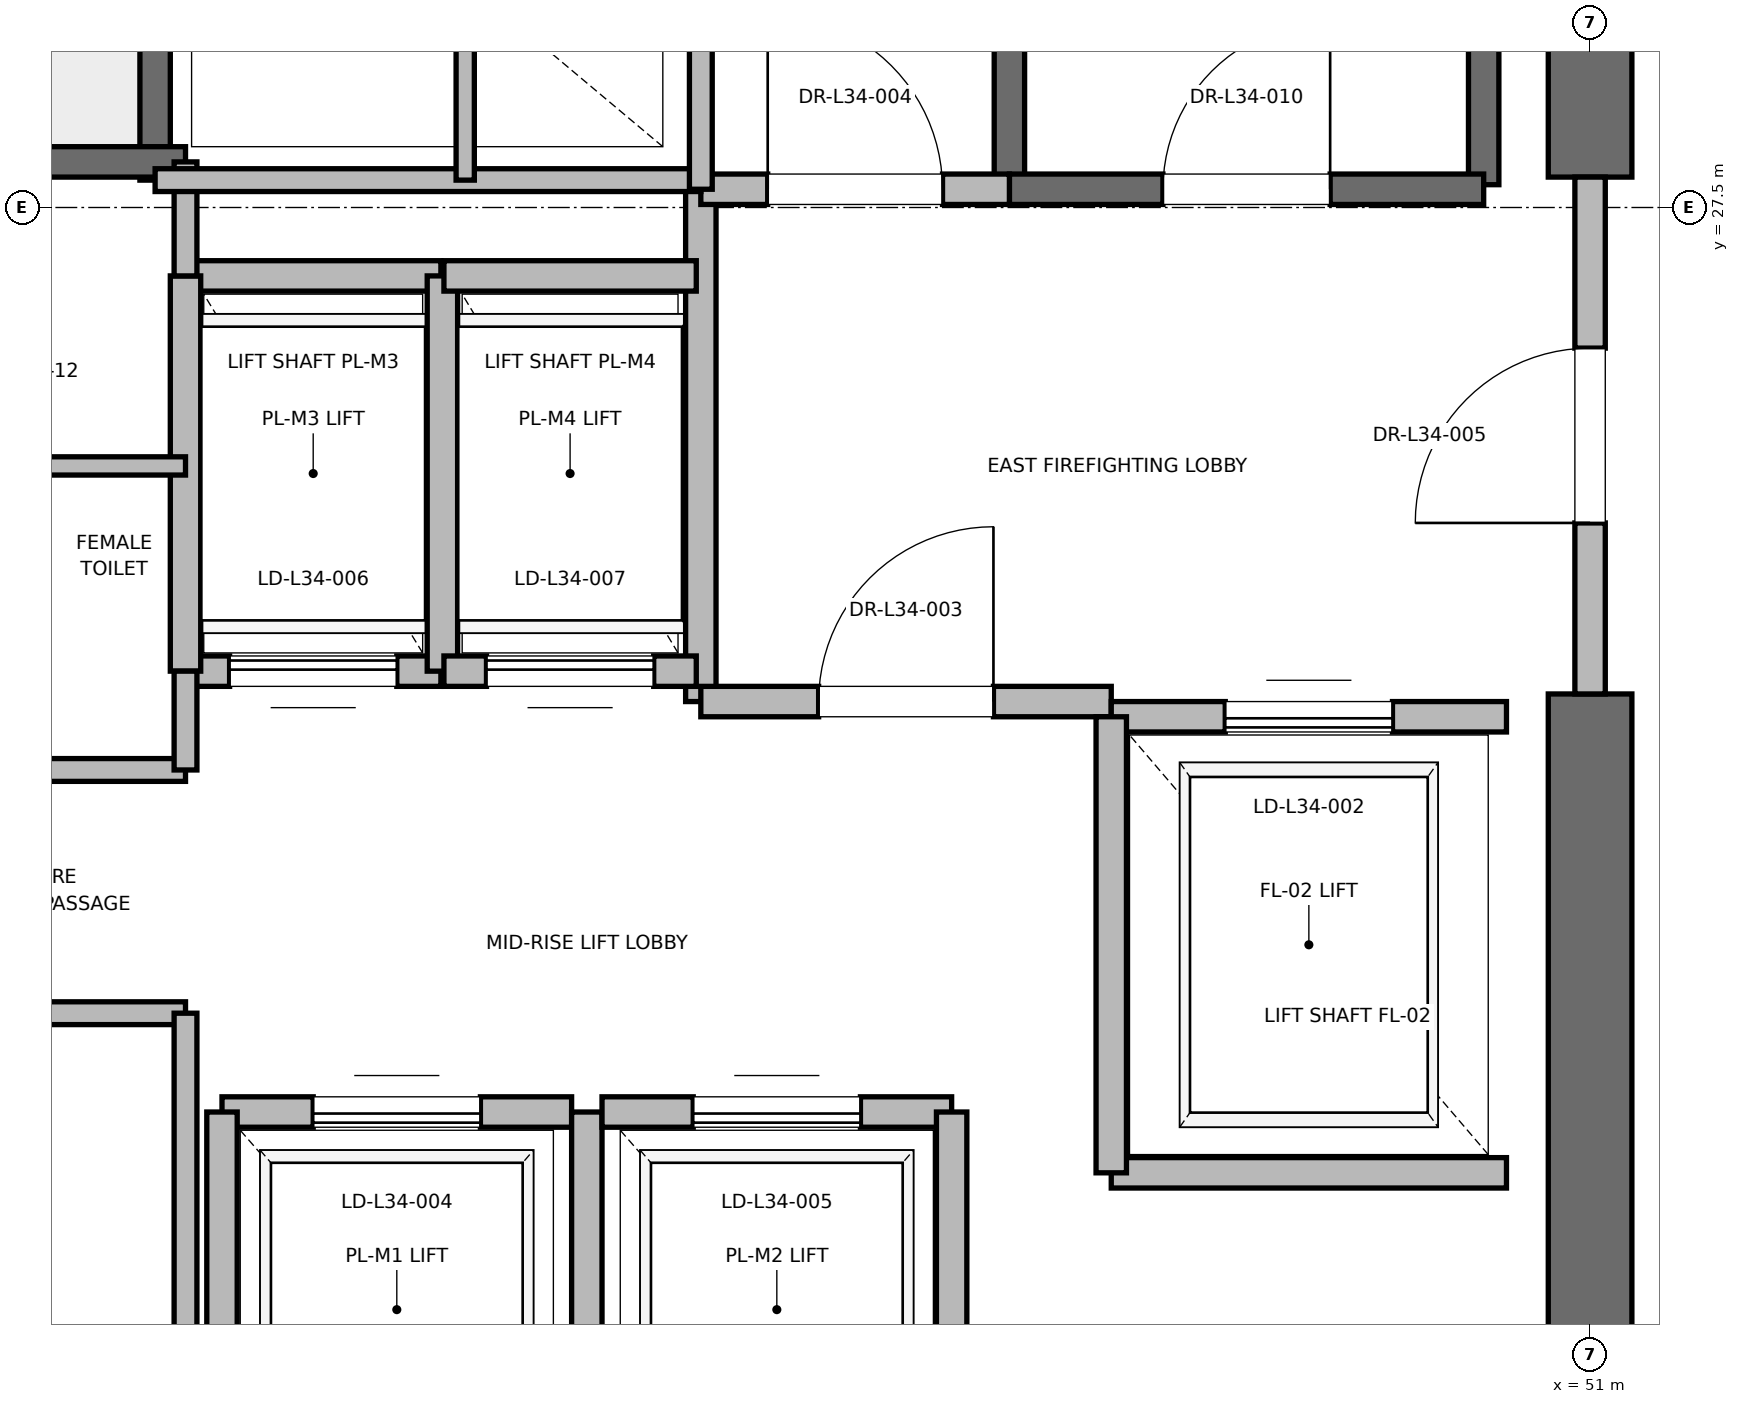
"""IFC4 building model, lengths in metres.
Left out: names, types, materials, properties, quantities, classifications, styles, units other than length and angle.
Written with IfcOpenShell. Run it as: python <this file> out.ifc"""

import sys

from ifc_helpers import new_model, si_unit, direction, frame, frame_2d, origin, place, context, subcontext, project, spatial, rectangle, extrude, element, fill, save


model = new_model("IFC4")
c1 = context("Model", 3, precision=1e-05, world=origin(), true_north=direction((0.0, 1.0)))
c2 = subcontext(c1, "Body", "Model", "MODEL_VIEW")
j1 = project(units=[si_unit("LENGTHUNIT", "METRE"), si_unit("PLANEANGLEUNIT", "RADIAN")], contexts=[c1])
p1 = place(None, origin())
s1 = spatial("IfcSite", under=j1, at=p1, CompositionType="ELEMENT")
p2 = place(p1, origin())
s2 = spatial("IfcBuilding", under=s1, at=p2, CompositionType="ELEMENT")
p3 = place(p2, frame((0.0, 0.0, 148.4)))
s3 = spatial("IfcBuildingStorey", under=s2, at=p3, CompositionType="ELEMENT", Elevation=148.4)
p4 = place(p3, frame((51.0, 18.5, 0.0), z_axis=(0.0, 0.0, 1.0), x_axis=(0.0, 1.0, 0.0)))
e1 = element("IfcWall", 1, at=p4, inside=s3, PredefinedType="SHEAR", context=c2, shape_type="SweptSolid", body=[
    extrude(rectangle(XDim=5.8, YDim=0.55, at=frame_2d((2.9, 0.0))), origin(), (0.0, 0.0, 1.0), 3.775),
])
p5 = place(p3, frame((51.0, 27.7, 0.0), z_axis=(0.0, 0.0, 1.0), x_axis=(0.0, 1.0, 0.0)))
e2 = element("IfcWall", 2, at=p5, inside=s3, PredefinedType="SHEAR", context=c2, shape_type="SweptSolid", body=[
    extrude(rectangle(XDim=8.8, YDim=0.55, at=frame_2d((4.4, 0.0))), origin(), (0.0, 0.0, 1.0), 3.775),
])
p6 = place(p3, frame((50.3, 27.65, 0.0), z_axis=(0.0, 0.0, 1.0), x_axis=(0.0, 1.0, 0.0)))
e3 = element("IfcWall", 3, at=p6, inside=s3, PredefinedType="SOLIDWALL", context=c2, shape_type="SweptSolid", body=[
    extrude(rectangle(XDim=8.15, YDim=0.2, at=frame_2d((4.075, 0.0))), origin(), (0.0, 0.0, 1.0), 3.775),
])
p7 = place(p3, frame((47.18, 27.62, 0.0), z_axis=(0.0, 0.0, 1.0), x_axis=(0.0, 1.0, 0.0)))
e4 = element("IfcWall", 4, at=p7, inside=s3, PredefinedType="SOLIDWALL", context=c2, shape_type="SweptSolid", body=[
    extrude(rectangle(XDim=8.18, YDim=0.2, at=frame_2d((4.09, 0.0))), origin(), (0.0, 0.0, 1.0), 3.775),
])
p8 = place(p3, frame((47.18, 27.62, 0.0), z_axis=(0.0, 0.0, 1.0), x_axis=(1.0, 0.0, 0.0)))
e5 = element("IfcWall", 5, at=p8, inside=s3, PredefinedType="SOLIDWALL", context=c2, shape_type="SweptSolid", body=[
    extrude(rectangle(XDim=3.12, YDim=0.2, at=frame_2d((1.56, 0.0))), origin(), (0.0, 0.0, 1.0), 3.775),
])
p9 = place(p8, frame((1.01, 0.0, 0.0)))
e6 = element("IfcOpeningElement", 6, at=p9, cuts=e5, PredefinedType="OPENING", context=c2, shape_type="SweptSolid", body=[
    extrude(rectangle(XDim=1.1, YDim=2.15, at=frame_2d((0.55, 1.075))), frame((0.0, 0.1, 0.0), z_axis=(0.0, -1.0, 0.0), x_axis=(1.0, 0.0, 0.0)), (0.0, 0.0, 1.0), 0.2),
])
p10 = place(p3, frame((41.56, 27.68, 0.0), z_axis=(0.0, 0.0, 1.0), x_axis=(0.0, 1.0, 0.0)))
e7 = element("IfcWall", 7, at=p10, inside=s3, PredefinedType="SOLIDWALL", context=c2, shape_type="SweptSolid", body=[
    extrude(rectangle(XDim=8.57, YDim=0.2, at=frame_2d((4.285, 0.0))), origin(), (0.0, 0.0, 1.0), 3.775),
])
p11 = place(p3, frame((38.44, 27.8, 0.0), z_axis=(0.0, 0.0, 1.0), x_axis=(1.0, 0.0, 0.0)))
e8 = element("IfcWall", 8, at=p11, inside=s3, PredefinedType="SOLIDWALL", context=c2, shape_type="SweptSolid", body=[
    extrude(rectangle(XDim=3.32, YDim=0.2, at=frame_2d((1.66, 0.0))), origin(), (0.0, 0.0, 1.0), 3.775),
])
p12 = place(p3, frame((45.15, 24.25, 0.0), z_axis=(0.0, 0.0, 1.0), x_axis=(0.0, 1.0, 0.0)))
e9 = element("IfcWall", 9, at=p12, inside=s3, PredefinedType="PARTITIONING", context=c2, shape_type="SweptSolid", body=[
    extrude(rectangle(XDim=3.37, YDim=0.2, at=frame_2d((1.685, 0.0))), origin(), (0.0, 0.0, 1.0), 3.775),
])
p13 = place(p3, frame((45.15, 24.25, 0.0), z_axis=(0.0, 0.0, 1.0), x_axis=(1.0, 0.0, 0.0)))
e10 = element("IfcWall", 10, at=p13, inside=s3, PredefinedType="PARTITIONING", context=c2, shape_type="SweptSolid", body=[
    extrude(rectangle(XDim=2.7, YDim=0.2, at=frame_2d((1.35, 0.0))), origin(), (0.0, 0.0, 1.0), 3.775),
])
p14 = place(p13, frame((0.775, 0.0, 0.0)))
e11 = element("IfcOpeningElement", 11, at=p14, cuts=e10, PredefinedType="OPENING", context=c2, shape_type="SweptSolid", body=[
    extrude(rectangle(XDim=1.15, YDim=2.2, at=frame_2d((0.575, 1.1))), frame((0.0, 0.1, 0.0), z_axis=(0.0, -1.0, 0.0), x_axis=(1.0, 0.0, 0.0)), (0.0, 0.0, 1.0), 0.2),
])
p15 = place(p3, frame((45.15, 27.62, 0.0), z_axis=(0.0, 0.0, 1.0), x_axis=(1.0, 0.0, 0.0)))
e12 = element("IfcWall", 12, at=p15, inside=s3, PredefinedType="PARTITIONING", context=c2, shape_type="SweptSolid", body=[
    extrude(rectangle(XDim=2.03, YDim=0.2, at=frame_2d((1.015, 0.0))), origin(), (0.0, 0.0, 1.0), 3.775),
])
p16 = place(p15, frame((0.44, 0.0, 0.0)))
e13 = element("IfcOpeningElement", 13, at=p16, cuts=e12, PredefinedType="OPENING", context=c2, shape_type="SweptSolid", body=[
    extrude(rectangle(XDim=1.15, YDim=2.2, at=frame_2d((0.575, 1.1))), frame((0.0, 0.1, 0.0), z_axis=(0.0, -1.0, 0.0), x_axis=(1.0, 0.0, 0.0)), (0.0, 0.0, 1.0), 0.2),
])
p17 = place(p3, frame((51.0, 24.3, 0.0), z_axis=(0.0, 0.0, 1.0), x_axis=(0.0, 1.0, 0.0)))
e14 = element("IfcWall", 14, at=p17, inside=s3, PredefinedType="PARTITIONING", context=c2, shape_type="SweptSolid", body=[
    extrude(rectangle(XDim=3.4, YDim=0.2, at=frame_2d((1.7, 0.0))), origin(), (0.0, 0.0, 1.0), 2.755),
])
p18 = place(p17, frame((1.125, 0.0, 0.0)))
e15 = element("IfcOpeningElement", 15, at=p18, cuts=e14, PredefinedType="OPENING", context=c2, shape_type="SweptSolid", body=[
    extrude(rectangle(XDim=1.15, YDim=2.2, at=frame_2d((0.575, 1.1))), frame((0.0, 0.1, 0.0), z_axis=(0.0, -1.0, 0.0), x_axis=(1.0, 0.0, 0.0)), (0.0, 0.0, 1.0), 0.2),
])
p19 = place(p3, frame((47.85, 21.15, 0.0), z_axis=(0.0, 0.0, 1.0), x_axis=(1.0, 0.0, 0.0)))
e16 = element("IfcWall", 16, at=p19, inside=s3, PredefinedType="SOLIDWALL", context=c2, shape_type="SweptSolid", body=[
    extrude(rectangle(XDim=2.6, YDim=0.2, at=frame_2d((1.3, 0.0))), origin(), (0.0, 0.0, 1.0), 3.775),
])
p20 = place(p3, frame((50.45, 24.15, 0.0), z_axis=(0.0, 0.0, 1.0), x_axis=(-1.0, 0.0, 0.0)))
e17 = element("IfcWall", 17, at=p20, inside=s3, PredefinedType="SOLIDWALL", context=c2, shape_type="SweptSolid", body=[
    extrude(rectangle(XDim=2.6, YDim=0.2, at=frame_2d((1.3, 0.0))), origin(), (0.0, 0.0, 1.0), 2.755),
])
p21 = place(p20, frame((0.75, 0.0, 0.0)))
e18 = element("IfcOpeningElement", 18, at=p21, cuts=e17, PredefinedType="OPENING", context=c2, shape_type="SweptSolid", body=[
    extrude(rectangle(XDim=1.1, YDim=2.2, at=frame_2d((0.55, 1.1))), frame((0.0, 0.1, 0.0), z_axis=(0.0, -1.0, 0.0), x_axis=(1.0, 0.0, 0.0)), (0.0, 0.0, 1.0), 0.2),
])
p22 = place(p3, frame((47.85, 24.15, 0.0), z_axis=(0.0, 0.0, 1.0), x_axis=(0.0, -1.0, 0.0)))
e19 = element("IfcWall", 19, at=p22, inside=s3, PredefinedType="SOLIDWALL", context=c2, shape_type="SweptSolid", body=[
    extrude(rectangle(XDim=3.0, YDim=0.2, at=frame_2d((1.5, 0.0))), origin(), (0.0, 0.0, 1.0), 3.775),
])
p23 = place(p3, frame((44.3, 21.55, 0.0), z_axis=(0.0, 0.0, 1.0), x_axis=(-1.0, 0.0, 0.0)))
e20 = element("IfcWall", 20, at=p23, inside=s3, PredefinedType="SOLIDWALL", context=c2, shape_type="SweptSolid", body=[
    extrude(rectangle(XDim=2.3, YDim=0.2, at=frame_2d((1.15, 0.0))), origin(), (0.0, 0.0, 1.0), 3.775),
])
p24 = place(p23, frame((0.6, 0.0, 0.0)))
e21 = element("IfcOpeningElement", 21, at=p24, cuts=e20, PredefinedType="OPENING", context=c2, shape_type="SweptSolid", body=[
    extrude(rectangle(XDim=1.1, YDim=2.2, at=frame_2d((0.55, 1.1))), frame((0.0, 0.1, 0.0), z_axis=(0.0, -1.0, 0.0), x_axis=(1.0, 0.0, 0.0)), (0.0, 0.0, 1.0), 0.2),
])
p25 = place(p3, frame((42.0, 21.55, 0.0), z_axis=(0.0, 0.0, 1.0), x_axis=(0.0, -1.0, 0.0)))
e22 = element("IfcWall", 22, at=p25, inside=s3, PredefinedType="SOLIDWALL", context=c2, shape_type="SweptSolid", body=[
    extrude(rectangle(XDim=2.6, YDim=0.2, at=frame_2d((1.3, 0.0))), origin(), (0.0, 0.0, 1.0), 2.755),
])
p26 = place(p3, frame((44.4, 18.95, 0.0), z_axis=(0.0, 0.0, 1.0), x_axis=(0.0, 1.0, 0.0)))
e23 = element("IfcWall", 23, at=p26, inside=s3, PredefinedType="SOLIDWALL", context=c2, shape_type="SweptSolid", body=[
    extrude(rectangle(XDim=2.6, YDim=0.2, at=frame_2d((1.3, 0.0))), origin(), (0.0, 0.0, 1.0), 3.775),
])
p27 = place(p3, frame((46.8, 21.55, 0.0), z_axis=(0.0, 0.0, 1.0), x_axis=(-1.0, 0.0, 0.0)))
e24 = element("IfcWall", 24, at=p27, inside=s3, PredefinedType="SOLIDWALL", context=c2, shape_type="SweptSolid", body=[
    extrude(rectangle(XDim=2.3, YDim=0.2, at=frame_2d((1.15, 0.0))), origin(), (0.0, 0.0, 1.0), 3.775),
])
p28 = place(p27, frame((0.6, 0.0, 0.0)))
e25 = element("IfcOpeningElement", 25, at=p28, cuts=e24, PredefinedType="OPENING", context=c2, shape_type="SweptSolid", body=[
    extrude(rectangle(XDim=1.1, YDim=2.2, at=frame_2d((0.55, 1.1))), frame((0.0, 0.1, 0.0), z_axis=(0.0, -1.0, 0.0), x_axis=(1.0, 0.0, 0.0)), (0.0, 0.0, 1.0), 0.2),
])
p29 = place(p3, frame((46.8, 18.95, 0.0), z_axis=(0.0, 0.0, 1.0), x_axis=(0.0, 1.0, 0.0)))
e26 = element("IfcWall", 26, at=p29, inside=s3, PredefinedType="SOLIDWALL", context=c2, shape_type="SweptSolid", body=[
    extrude(rectangle(XDim=2.6, YDim=0.2, at=frame_2d((1.3, 0.0))), origin(), (0.0, 0.0, 1.0), 3.775),
])
p30 = place(p3, frame((41.76, 24.45, 0.0), z_axis=(0.0, 0.0, 1.0), x_axis=(1.0, 0.0, 0.0)))
e27 = element("IfcWall", 27, at=p30, inside=s3, PredefinedType="SOLIDWALL", context=c2, shape_type="SweptSolid", body=[
    extrude(rectangle(XDim=1.68, YDim=0.2, at=frame_2d((0.84, 0.0))), origin(), (0.0, 0.0, 1.0), 3.775),
])
p31 = place(p30, frame((0.29, 0.0, 0.0)))
e28 = element("IfcOpeningElement", 28, at=p31, cuts=e27, PredefinedType="OPENING", context=c2, shape_type="SweptSolid", body=[
    extrude(rectangle(XDim=1.1, YDim=2.2, at=frame_2d((0.55, 1.1))), frame((0.0, 0.1, 0.0), z_axis=(0.0, -1.0, 0.0), x_axis=(1.0, 0.0, 0.0)), (0.0, 0.0, 1.0), 0.2),
])
p32 = place(p3, frame((43.44, 27.05, 0.0), z_axis=(0.0, 0.0, 1.0), x_axis=(-1.0, 0.0, 0.0)))
e29 = element("IfcWall", 29, at=p32, inside=s3, PredefinedType="SOLIDWALL", context=c2, shape_type="SweptSolid", body=[
    extrude(rectangle(XDim=1.68, YDim=0.2, at=frame_2d((0.84, 0.0))), origin(), (0.0, 0.0, 1.0), 3.775),
])
for number, where, z_axis, x_axis in (
    (30, (41.76, 27.05, 0.0), (0.0, 0.0, 1.0), (0.0, -1.0, 0.0)),
    (31, (43.45, 24.45, 0.0), (0.0, 0.0, 1.0), (0.0, 1.0, 0.0)),
):
    element("IfcWall", number, at=place(p3, frame(where, z_axis=z_axis, x_axis=x_axis)), inside=s3, PredefinedType="SOLIDWALL", context=c2, shape_type="SweptSolid", body=[
        extrude(rectangle(XDim=2.6, YDim=0.2, at=frame_2d((1.3, 0.0))), origin(), (0.0, 0.0, 1.0), 3.775),
    ])
p33 = place(p3, frame((43.46, 24.45, 0.0), z_axis=(0.0, 0.0, 1.0), x_axis=(1.0, 0.0, 0.0)))
e32 = element("IfcWall", 32, at=p33, inside=s3, PredefinedType="SOLIDWALL", context=c2, shape_type="SweptSolid", body=[
    extrude(rectangle(XDim=1.66, YDim=0.2, at=frame_2d((0.83, 0.0))), origin(), (0.0, 0.0, 1.0), 3.775),
])
p34 = place(p33, frame((0.28, 0.0, 0.0)))
e33 = element("IfcOpeningElement", 33, at=p34, cuts=e32, PredefinedType="OPENING", context=c2, shape_type="SweptSolid", body=[
    extrude(rectangle(XDim=1.1, YDim=2.2, at=frame_2d((0.55, 1.1))), frame((0.0, 0.1, 0.0), z_axis=(0.0, -1.0, 0.0), x_axis=(1.0, 0.0, 0.0)), (0.0, 0.0, 1.0), 0.2),
])
p35 = place(p3, frame((45.12, 27.05, 0.0), z_axis=(0.0, 0.0, 1.0), x_axis=(-1.0, 0.0, 0.0)))
e34 = element("IfcWall", 34, at=p35, inside=s3, PredefinedType="SOLIDWALL", context=c2, shape_type="SweptSolid", body=[
    extrude(rectangle(XDim=1.66, YDim=0.2, at=frame_2d((0.83, 0.0))), origin(), (0.0, 0.0, 1.0), 3.775),
])
for number, where, z_axis, x_axis in (
    (35, (39.95, 22.2, 0.0), (0.0, 0.0, 1.0), (1.0, 0.0, 0.0)),
    (36, (39.95, 23.8, 0.0), (0.0, 0.0, 1.0), (1.0, 0.0, 0.0)),
):
    element("IfcWall", number, at=place(p3, frame(where, z_axis=z_axis, x_axis=x_axis)), inside=s3, PredefinedType="PARTITIONING", context=c2, shape_type="SweptSolid", body=[
        extrude(rectangle(XDim=1.81, YDim=0.15, at=frame_2d((0.905, 0.0))), origin(), (0.0, 0.0, 1.0), 2.85),
    ])
p36 = place(p3, frame((39.95, 25.8, 0.0), z_axis=(0.0, 0.0, 1.0), x_axis=(1.0, 0.0, 0.0)))
e37 = element("IfcWall", 37, at=p36, inside=s3, PredefinedType="PARTITIONING", context=c2, shape_type="SweptSolid", body=[
    extrude(rectangle(XDim=1.81, YDim=0.12, at=frame_2d((0.905, 0.0))), origin(), (0.0, 0.0, 1.0), 2.85),
])
p37 = place(p3, frame((41.76, 18.6, 0.0), z_axis=(0.0, 0.0, 1.0), x_axis=(0.0, 1.0, 0.0)))
e38 = element("IfcWall", 38, at=p37, inside=s3, PredefinedType="PARTITIONING", context=c2, shape_type="SweptSolid", body=[
    extrude(rectangle(XDim=3.6, YDim=0.15, at=frame_2d((1.8, 0.0))), origin(), (0.0, 0.0, 1.0), 2.755),
])
p38 = place(p3, frame((41.76, 23.8, 0.0), z_axis=(0.0, 0.0, 1.0), x_axis=(0.0, 1.0, 0.0)))
e39 = element("IfcWall", 39, at=p38, inside=s3, PredefinedType="PARTITIONING", context=c2, shape_type="SweptSolid", body=[
    extrude(rectangle(XDim=0.65, YDim=0.15, at=frame_2d((0.325, 0.0))), origin(), (0.0, 0.0, 1.0), 2.85),
])
p39 = place(p3, frame((41.76, 27.05, 0.0), z_axis=(0.0, 0.0, 1.0), x_axis=(0.0, 1.0, 0.0)))
e40 = element("IfcWall", 40, at=p39, inside=s3, PredefinedType="PARTITIONING", context=c2, shape_type="SweptSolid", body=[
    extrude(rectangle(XDim=0.75, YDim=0.15, at=frame_2d((0.375, 0.0))), origin(), (0.0, 0.0, 1.0), 2.85),
])
p40 = place(p3, frame((41.56, 27.68, 0.0), z_axis=(0.0, 0.0, 1.0), x_axis=(1.0, 0.0, 0.0)))
e41 = element("IfcWall", 41, at=p40, inside=s3, PredefinedType="PARTITIONING", context=c2, shape_type="SweptSolid", body=[
    extrude(rectangle(XDim=3.59, YDim=0.15, at=frame_2d((1.795, 0.0))), origin(), (0.0, 0.0, 1.0), 2.85),
])
p41 = place(p3, frame((45.15, 27.62, 0.0), z_axis=(0.0, 0.0, 1.0), x_axis=(0.0, 1.0, 0.0)))
e42 = element("IfcWall", 42, at=p41, inside=s3, PredefinedType="PARTITIONING", context=c2, shape_type="SweptSolid", body=[
    extrude(rectangle(XDim=3.1, YDim=0.15, at=frame_2d((1.55, 0.0))), origin(), (0.0, 0.0, 1.0), 2.85),
])
p42 = place(p3, frame((43.6, 27.68, 0.0), z_axis=(0.0, 0.0, 1.0), x_axis=(0.0, 1.0, 0.0)))
e43 = element("IfcWall", 43, at=p42, inside=s3, PredefinedType="PARTITIONING", context=c2, shape_type="SweptSolid", body=[
    extrude(rectangle(XDim=3.04, YDim=0.12, at=frame_2d((1.52, 0.0))), origin(), (0.0, 0.0, 1.0), 2.85),
])
p43 = place(p9, origin())
e44 = element("IfcDoor", 44, at=p43, inside=s3, OperationType="SINGLE_SWING_RIGHT", PredefinedType="DOOR", context=c2, shape_type="SweptSolid", body=[
    extrude(rectangle(XDim=1.1, YDim=2.15, at=frame_2d((0.55, 1.075))), frame((0.0, 0.025, 0.0), z_axis=(0.0, -1.0, 0.0), x_axis=(1.0, 0.0, 0.0)), (0.0, 0.0, 1.0), 0.05),
])
fill(e6, e44)
p44 = place(p14, origin())
e45 = element("IfcDoor", 45, at=p44, inside=s3, OperationType="SINGLE_SWING_RIGHT", PredefinedType="DOOR", context=c2, shape_type="SweptSolid", body=[
    extrude(rectangle(XDim=1.15, YDim=2.2, at=frame_2d((0.575, 1.1))), frame((0.0, 0.025, 0.0), z_axis=(0.0, -1.0, 0.0), x_axis=(1.0, 0.0, 0.0)), (0.0, 0.0, 1.0), 0.05),
])
fill(e11, e45)
p45 = place(p16, origin())
e46 = element("IfcDoor", 46, at=p45, inside=s3, OperationType="SINGLE_SWING_LEFT", PredefinedType="DOOR", context=c2, shape_type="SweptSolid", body=[
    extrude(rectangle(XDim=1.15, YDim=2.2, at=frame_2d((0.575, 1.1))), frame((0.0, 0.025, 0.0), z_axis=(0.0, -1.0, 0.0), x_axis=(1.0, 0.0, 0.0)), (0.0, 0.0, 1.0), 0.05),
])
fill(e13, e46)
p46 = place(p18, origin())
e47 = element("IfcDoor", 47, at=p46, inside=s3, OperationType="SINGLE_SWING_LEFT", PredefinedType="DOOR", context=c2, shape_type="SweptSolid", body=[
    extrude(rectangle(XDim=1.15, YDim=2.2, at=frame_2d((0.575, 1.1))), frame((0.0, 0.025, 0.0), z_axis=(0.0, -1.0, 0.0), x_axis=(1.0, 0.0, 0.0)), (0.0, 0.0, 1.0), 0.05),
])
fill(e15, e47)
p47 = place(p21, origin())
e48 = element("IfcDoor", 48, at=p47, inside=s3, OperationType="SLIDING_TO_RIGHT", PredefinedType="DOOR", context=c2, shape_type="SweptSolid", body=[
    extrude(rectangle(XDim=1.1, YDim=2.2, at=frame_2d((0.55, 1.1))), frame((0.0, 0.025, 0.0), z_axis=(0.0, -1.0, 0.0), x_axis=(1.0, 0.0, 0.0)), (0.0, 0.0, 1.0), 0.05),
])
fill(e18, e48)
p48 = place(p24, origin())
e49 = element("IfcDoor", 49, at=p48, inside=s3, OperationType="SLIDING_TO_RIGHT", PredefinedType="DOOR", context=c2, shape_type="SweptSolid", body=[
    extrude(rectangle(XDim=1.1, YDim=2.2, at=frame_2d((0.55, 1.1))), frame((0.0, 0.025, 0.0), z_axis=(0.0, -1.0, 0.0), x_axis=(1.0, 0.0, 0.0)), (0.0, 0.0, 1.0), 0.05),
])
fill(e21, e49)
p49 = place(p28, origin())
e50 = element("IfcDoor", 50, at=p49, inside=s3, OperationType="SLIDING_TO_RIGHT", PredefinedType="DOOR", context=c2, shape_type="SweptSolid", body=[
    extrude(rectangle(XDim=1.1, YDim=2.2, at=frame_2d((0.55, 1.1))), frame((0.0, 0.025, 0.0), z_axis=(0.0, -1.0, 0.0), x_axis=(1.0, 0.0, 0.0)), (0.0, 0.0, 1.0), 0.05),
])
fill(e25, e50)
p50 = place(p31, origin())
e51 = element("IfcDoor", 51, at=p50, inside=s3, OperationType="SLIDING_TO_RIGHT", PredefinedType="DOOR", context=c2, shape_type="SweptSolid", body=[
    extrude(rectangle(XDim=1.1, YDim=2.2, at=frame_2d((0.55, 1.1))), frame((0.0, 0.025, 0.0), z_axis=(0.0, -1.0, 0.0), x_axis=(1.0, 0.0, 0.0)), (0.0, 0.0, 1.0), 0.05),
])
fill(e28, e51)
p51 = place(p34, origin())
e52 = element("IfcDoor", 52, at=p51, inside=s3, OperationType="SLIDING_TO_RIGHT", PredefinedType="DOOR", context=c2, shape_type="SweptSolid", body=[
    extrude(rectangle(XDim=1.1, YDim=2.2, at=frame_2d((0.55, 1.1))), frame((0.0, 0.025, 0.0), z_axis=(0.0, -1.0, 0.0), x_axis=(1.0, 0.0, 0.0)), (0.0, 0.0, 1.0), 0.05),
])
fill(e33, e52)
save(model, sys.argv[1])
